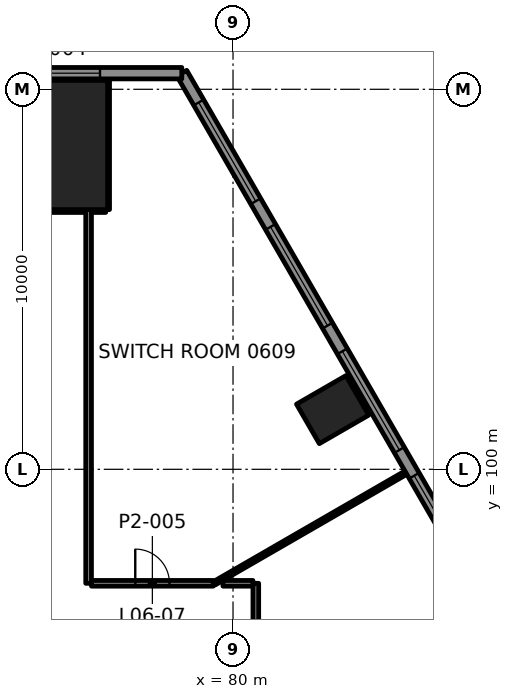
"""IFC4 building model, lengths in metres.
Left out: names, types, materials, properties, quantities, classifications, styles, units other than length and angle.
Written with IfcOpenShell. Run it as: python <this file> out.ifc"""

import sys

from ifc_helpers import new_model, si_unit, direction, frame, frame_2d, origin, origin_2d, place, context, subcontext, project, spatial, rectangle, extrude, element, fill, save


model = new_model("IFC4")
c1 = context("Model", 3, precision=1e-05, world=origin(), true_north=direction((0.0, 1.0)))
c2 = subcontext(c1, "Body", "Model", "MODEL_VIEW")
j1 = project(units=[si_unit("LENGTHUNIT", "METRE"), si_unit("PLANEANGLEUNIT", "RADIAN")], contexts=[c1])
p1 = place(None, origin())
s1 = spatial("IfcSite", under=j1, at=p1, CompositionType="ELEMENT")
p2 = place(p1, origin())
s2 = spatial("IfcBuilding", under=s1, at=p2, CompositionType="ELEMENT")
p3 = place(p2, frame((0.0, 0.0, 31.0)))
s3 = spatial("IfcBuildingStorey", under=s2, at=p3, CompositionType="ELEMENT", Elevation=31.0)
p4 = place(p3, frame((75.0, 108.534, 0.0), z_axis=(0.0, 0.0, 1.0), x_axis=(-1.0, 0.0, 0.0)))
e1 = element("IfcColumn", 1, at=p4, inside=s3, PredefinedType="COLUMN", context=c2, shape_type="SweptSolid", body=[
    extrude(rectangle(XDim=3.4, YDim=3.4, at=origin_2d()), origin(), (0.0, 0.0, 1.0), 4.5),
])
p5 = place(p3, frame((82.621, 101.57, -0.0), z_axis=(0.0, 0.0, 1.0), x_axis=(-0.5, 0.866025403784, 0.0)))
e2 = element("IfcColumn", 2, at=p5, inside=s3, PredefinedType="COLUMN", context=c2, shape_type="SweptSolid", body=[
    extrude(rectangle(XDim=1.2, YDim=1.5, at=origin_2d()), origin(), (0.0, 0.0, 1.0), 4.5),
])
p6 = place(p3, frame((76.275, 97.0, 0.0), z_axis=(0.0, 0.0, 1.0), x_axis=(1.0, 0.0, 0.0)))
e3 = element("IfcWall", 3, at=p6, inside=s3, PredefinedType="PARTITIONING", context=c2, shape_type="SweptSolid", body=[
    extrude(rectangle(XDim=3.205, YDim=0.15, at=frame_2d((1.603, 0.0))), origin(), (0.0, 0.0, 1.0), 3.45),
])
p7 = place(p6, frame((1.153, 0.0, 0.0)))
e4 = element("IfcOpeningElement", 4, at=p7, cuts=e3, PredefinedType="OPENING", context=c2, shape_type="SweptSolid", body=[
    extrude(rectangle(XDim=0.9, YDim=2.1, at=frame_2d((0.45, 1.05))), frame((0.0, 0.085, 0.0), z_axis=(0.0, -1.0, 0.0), x_axis=(1.0, 0.0, 0.0)), (0.0, 0.0, 1.0), 0.17),
])
p8 = place(p3, frame((73.875, 106.834, 0.0), z_axis=(0.0, 0.0, 1.0), x_axis=(1.0, 0.0, 0.0)))
e5 = element("IfcWall", 5, at=p8, inside=s3, PredefinedType="PARTITIONING", context=c2, shape_type="SweptSolid", body=[
    extrude(rectangle(XDim=2.25, YDim=0.15, at=frame_2d((1.125, 0.0))), origin(), (0.0, 0.0, 1.0), 3.447),
])
p9 = place(p3, frame((79.505, 97.0, 0.0), z_axis=(0.0, 0.0, 1.0), x_axis=(0.866009767966, 0.500027081053, 0.0)))
e6 = element("IfcWall", 6, at=p9, inside=s3, PredefinedType="PARTITIONING", context=c2, shape_type="SweptSolid", body=[
    extrude(rectangle(XDim=5.943, YDim=0.1, at=frame_2d((2.972, 0.0))), origin(), (0.0, 0.0, 1.0), 3.215),
])
p10 = place(p3, frame((80.6, 86.4, 0.0), z_axis=(0.0, 0.0, 1.0), x_axis=(0.0, 1.0, 0.0)))
e7 = element("IfcWall", 7, at=p10, inside=s3, PredefinedType="PARTITIONING", context=c2, shape_type="SweptSolid", body=[
    extrude(rectangle(XDim=10.6, YDim=0.15, at=frame_2d((5.3, 0.0))), origin(), (0.0, 0.0, 1.0), 3.45),
])
p11 = place(p3, frame((76.7, 106.834, 0.0), z_axis=(0.0, 0.0, 1.0), x_axis=(0.0, 1.0, 0.0)))
e8 = element("IfcWall", 8, at=p11, inside=s3, PredefinedType="PARTITIONING", context=c2, shape_type="SweptSolid", body=[
    extrude(rectangle(XDim=3.56, YDim=0.1, at=frame_2d((1.78, 0.0))), origin(), (0.0, 0.0, 1.0), 3.45),
])
p12 = place(p3, frame((76.2, 97.0, 0.0), z_axis=(0.0, 0.0, 1.0), x_axis=(0.0, 1.0, 0.0)))
e9 = element("IfcWall", 9, at=p12, inside=s3, PredefinedType="PARTITIONING", context=c2, shape_type="SweptSolid", body=[
    extrude(rectangle(XDim=9.834, YDim=0.15, at=frame_2d((4.917, 0.0))), origin(), (0.0, 0.0, 1.0), 3.45),
])
p13 = place(p3, frame((79.735, 97.0, 0.0), z_axis=(0.0, 0.0, 1.0), x_axis=(1.0, 0.0, 0.0)))
e10 = element("IfcWall", 10, at=p13, inside=s3, PredefinedType="PARTITIONING", context=c2, shape_type="SweptSolid", body=[
    extrude(rectangle(XDim=0.79, YDim=0.15, at=frame_2d((0.395, 0.0))), origin(), (0.0, 0.0, 1.0), 3.45),
])
p14 = place(p3, frame((76.275, 106.834, 0.0), z_axis=(0.0, 0.0, 1.0), x_axis=(1.0, 0.0, 0.0)))
e11 = element("IfcWall", 11, at=p14, inside=s3, PredefinedType="PARTITIONING", context=c2, shape_type="SweptSolid", body=[
    extrude(rectangle(XDim=0.375, YDim=0.15, at=frame_2d((0.187, 0.0))), origin(), (0.0, 0.0, 1.0), 3.45),
])
p15 = place(p3, frame((107.504, 60.451, 0.0), z_axis=(0.0, 0.0, 1.0), x_axis=(-0.500000550228, 0.86602508611, 0.0)))
e12 = element("IfcWall", 12, at=p15, inside=s3, PredefinedType="SOLIDWALL", context=c2, shape_type="SweptSolid", body=[
    extrude(rectangle(XDim=57.704, YDim=0.3, at=frame_2d((28.852, 0.0))), origin(), (0.0, 0.0, 1.0), 4.05),
])
p16 = place(p15, frame((0.89, 0.0, 0.8)))
e13 = element("IfcOpeningElement", 13, at=p16, cuts=e12, PredefinedType="OPENING", context=c2, shape_type="SweptSolid", body=[
    extrude(rectangle(XDim=3.0, YDim=2.4, at=frame_2d((1.5, 1.2))), frame((0.0, 0.16, 0.0), z_axis=(0.0, -1.0, 0.0), x_axis=(1.0, 0.0, 0.0)), (0.0, 0.0, 1.0), 0.32),
])
p17 = place(p15, frame((4.67, 0.0, 0.8)))
e14 = element("IfcOpeningElement", 14, at=p17, cuts=e12, PredefinedType="OPENING", context=c2, shape_type="SweptSolid", body=[
    extrude(rectangle(XDim=3.0, YDim=2.4, at=frame_2d((1.5, 1.2))), frame((0.0, 0.16, 0.0), z_axis=(0.0, -1.0, 0.0), x_axis=(1.0, 0.0, 0.0)), (0.0, 0.0, 1.0), 0.32),
])
p18 = place(p15, frame((8.451, 0.0, 0.8)))
e15 = element("IfcOpeningElement", 15, at=p18, cuts=e12, PredefinedType="OPENING", context=c2, shape_type="SweptSolid", body=[
    extrude(rectangle(XDim=3.0, YDim=2.4, at=frame_2d((1.5, 1.2))), frame((0.0, 0.16, 0.0), z_axis=(0.0, -1.0, 0.0), x_axis=(1.0, 0.0, 0.0)), (0.0, 0.0, 1.0), 0.32),
])
p19 = place(p15, frame((12.231, 0.0, 0.8)))
e16 = element("IfcOpeningElement", 16, at=p19, cuts=e12, PredefinedType="OPENING", context=c2, shape_type="SweptSolid", body=[
    extrude(rectangle(XDim=3.0, YDim=2.4, at=frame_2d((1.5, 1.2))), frame((0.0, 0.16, 0.0), z_axis=(0.0, -1.0, 0.0), x_axis=(1.0, 0.0, 0.0)), (0.0, 0.0, 1.0), 0.32),
])
p20 = place(p15, frame((16.011, 0.0, 0.8)))
e17 = element("IfcOpeningElement", 17, at=p20, cuts=e12, PredefinedType="OPENING", context=c2, shape_type="SweptSolid", body=[
    extrude(rectangle(XDim=3.0, YDim=2.4, at=frame_2d((1.5, 1.2))), frame((0.0, 0.16, 0.0), z_axis=(0.0, -1.0, 0.0), x_axis=(1.0, 0.0, 0.0)), (0.0, 0.0, 1.0), 0.32),
])
p21 = place(p15, frame((19.792, 0.0, 0.8)))
e18 = element("IfcOpeningElement", 18, at=p21, cuts=e12, PredefinedType="OPENING", context=c2, shape_type="SweptSolid", body=[
    extrude(rectangle(XDim=3.0, YDim=2.4, at=frame_2d((1.5, 1.2))), frame((0.0, 0.16, 0.0), z_axis=(0.0, -1.0, 0.0), x_axis=(1.0, 0.0, 0.0)), (0.0, 0.0, 1.0), 0.32),
])
p22 = place(p15, frame((23.572, 0.0, 0.8)))
e19 = element("IfcOpeningElement", 19, at=p22, cuts=e12, PredefinedType="OPENING", context=c2, shape_type="SweptSolid", body=[
    extrude(rectangle(XDim=3.0, YDim=2.4, at=frame_2d((1.5, 1.2))), frame((0.0, 0.16, 0.0), z_axis=(0.0, -1.0, 0.0), x_axis=(1.0, 0.0, 0.0)), (0.0, 0.0, 1.0), 0.32),
])
p23 = place(p15, frame((27.352, 0.0, 0.8)))
e20 = element("IfcOpeningElement", 20, at=p23, cuts=e12, PredefinedType="OPENING", context=c2, shape_type="SweptSolid", body=[
    extrude(rectangle(XDim=3.0, YDim=2.4, at=frame_2d((1.5, 1.2))), frame((0.0, 0.16, 0.0), z_axis=(0.0, -1.0, 0.0), x_axis=(1.0, 0.0, 0.0)), (0.0, 0.0, 1.0), 0.32),
])
p24 = place(p15, frame((31.132, 0.0, 0.8)))
e21 = element("IfcOpeningElement", 21, at=p24, cuts=e12, PredefinedType="OPENING", context=c2, shape_type="SweptSolid", body=[
    extrude(rectangle(XDim=3.0, YDim=2.4, at=frame_2d((1.5, 1.2))), frame((0.0, 0.16, 0.0), z_axis=(0.0, -1.0, 0.0), x_axis=(1.0, 0.0, 0.0)), (0.0, 0.0, 1.0), 0.32),
])
p25 = place(p15, frame((34.913, 0.0, 0.8)))
e22 = element("IfcOpeningElement", 22, at=p25, cuts=e12, PredefinedType="OPENING", context=c2, shape_type="SweptSolid", body=[
    extrude(rectangle(XDim=3.0, YDim=2.4, at=frame_2d((1.5, 1.2))), frame((0.0, 0.16, 0.0), z_axis=(0.0, -1.0, 0.0), x_axis=(1.0, 0.0, 0.0)), (0.0, 0.0, 1.0), 0.32),
])
p26 = place(p15, frame((38.693, 0.0, 0.8)))
e23 = element("IfcOpeningElement", 23, at=p26, cuts=e12, PredefinedType="OPENING", context=c2, shape_type="SweptSolid", body=[
    extrude(rectangle(XDim=3.0, YDim=2.4, at=frame_2d((1.5, 1.2))), frame((0.0, 0.16, 0.0), z_axis=(0.0, -1.0, 0.0), x_axis=(1.0, 0.0, 0.0)), (0.0, 0.0, 1.0), 0.32),
])
p27 = place(p15, frame((42.473, 0.0, 0.8)))
e24 = element("IfcOpeningElement", 24, at=p27, cuts=e12, PredefinedType="OPENING", context=c2, shape_type="SweptSolid", body=[
    extrude(rectangle(XDim=3.0, YDim=2.4, at=frame_2d((1.5, 1.2))), frame((0.0, 0.16, 0.0), z_axis=(0.0, -1.0, 0.0), x_axis=(1.0, 0.0, 0.0)), (0.0, 0.0, 1.0), 0.32),
])
p28 = place(p15, frame((46.253, 0.0, 0.8)))
e25 = element("IfcOpeningElement", 25, at=p28, cuts=e12, PredefinedType="OPENING", context=c2, shape_type="SweptSolid", body=[
    extrude(rectangle(XDim=3.0, YDim=2.4, at=frame_2d((1.5, 1.2))), frame((0.0, 0.16, 0.0), z_axis=(0.0, -1.0, 0.0), x_axis=(1.0, 0.0, 0.0)), (0.0, 0.0, 1.0), 0.32),
])
p29 = place(p15, frame((50.033, 0.0, 0.8)))
e26 = element("IfcOpeningElement", 26, at=p29, cuts=e12, PredefinedType="OPENING", context=c2, shape_type="SweptSolid", body=[
    extrude(rectangle(XDim=3.0, YDim=2.4, at=frame_2d((1.5, 1.2))), frame((0.0, 0.16, 0.0), z_axis=(0.0, -1.0, 0.0), x_axis=(1.0, 0.0, 0.0)), (0.0, 0.0, 1.0), 0.32),
])
p30 = place(p15, frame((53.814, 0.0, 0.8)))
e27 = element("IfcOpeningElement", 27, at=p30, cuts=e12, PredefinedType="OPENING", context=c2, shape_type="SweptSolid", body=[
    extrude(rectangle(XDim=3.0, YDim=2.4, at=frame_2d((1.5, 1.2))), frame((0.0, 0.16, 0.0), z_axis=(0.0, -1.0, 0.0), x_axis=(1.0, 0.0, 0.0)), (0.0, 0.0, 1.0), 0.32),
])
p31 = place(p3, frame((78.652, 110.424, 0.0), z_axis=(0.0, 0.0, 1.0), x_axis=(-1.0, 0.0, 0.0)))
e28 = element("IfcWall", 28, at=p31, inside=s3, PredefinedType="SOLIDWALL", context=c2, shape_type="SweptSolid", body=[
    extrude(rectangle(XDim=7.304, YDim=0.3, at=frame_2d((3.652, 0.0))), origin(), (0.0, 0.0, 1.0), 4.05),
])
p32 = place(p31, frame((2.152, 0.0, 0.8)))
e29 = element("IfcOpeningElement", 29, at=p32, cuts=e28, PredefinedType="OPENING", context=c2, shape_type="SweptSolid", body=[
    extrude(rectangle(XDim=3.0, YDim=2.4, at=frame_2d((1.5, 1.2))), frame((0.0, 0.16, 0.0), z_axis=(0.0, -1.0, 0.0), x_axis=(1.0, 0.0, 0.0)), (0.0, 0.0, 1.0), 0.32),
])
p33 = place(p7, origin())
e30 = element("IfcDoor", 30, at=p33, inside=s3, OperationType="SINGLE_SWING_RIGHT", PredefinedType="DOOR", context=c2, shape_type="SweptSolid", body=[
    extrude(rectangle(XDim=0.9, YDim=2.1, at=frame_2d((0.45, 1.05))), frame((0.0, 0.025, 0.0), z_axis=(0.0, -1.0, 0.0), x_axis=(1.0, 0.0, 0.0)), (0.0, 0.0, 1.0), 0.05),
])
fill(e4, e30)
p34 = place(p27, origin())
e31 = element("IfcWindow", 31, at=p34, inside=s3, PartitioningType="SINGLE_PANEL", PredefinedType="WINDOW", context=c2, shape_type="SweptSolid", body=[
    extrude(rectangle(XDim=3.0, YDim=2.4, at=frame_2d((1.5, 1.2))), frame((0.0, 0.03, 0.0), z_axis=(0.0, -1.0, 0.0), x_axis=(1.0, 0.0, 0.0)), (0.0, 0.0, 1.0), 0.06),
])
fill(e24, e31)
p35 = place(p28, origin())
e32 = element("IfcWindow", 32, at=p35, inside=s3, PartitioningType="SINGLE_PANEL", PredefinedType="WINDOW", context=c2, shape_type="SweptSolid", body=[
    extrude(rectangle(XDim=3.0, YDim=2.4, at=frame_2d((1.5, 1.2))), frame((0.0, 0.03, 0.0), z_axis=(0.0, -1.0, 0.0), x_axis=(1.0, 0.0, 0.0)), (0.0, 0.0, 1.0), 0.06),
])
fill(e25, e32)
p36 = place(p29, origin())
e33 = element("IfcWindow", 33, at=p36, inside=s3, PartitioningType="SINGLE_PANEL", PredefinedType="WINDOW", context=c2, shape_type="SweptSolid", body=[
    extrude(rectangle(XDim=3.0, YDim=2.4, at=frame_2d((1.5, 1.2))), frame((0.0, 0.03, 0.0), z_axis=(0.0, -1.0, 0.0), x_axis=(1.0, 0.0, 0.0)), (0.0, 0.0, 1.0), 0.06),
])
fill(e26, e33)
p37 = place(p30, origin())
e34 = element("IfcWindow", 34, at=p37, inside=s3, PartitioningType="SINGLE_PANEL", PredefinedType="WINDOW", context=c2, shape_type="SweptSolid", body=[
    extrude(rectangle(XDim=3.0, YDim=2.4, at=frame_2d((1.5, 1.2))), frame((0.0, 0.03, 0.0), z_axis=(0.0, -1.0, 0.0), x_axis=(1.0, 0.0, 0.0)), (0.0, 0.0, 1.0), 0.06),
])
fill(e27, e34)
p38 = place(p32, origin())
e35 = element("IfcWindow", 35, at=p38, inside=s3, PartitioningType="SINGLE_PANEL", PredefinedType="WINDOW", context=c2, shape_type="SweptSolid", body=[
    extrude(rectangle(XDim=3.0, YDim=2.4, at=frame_2d((1.5, 1.2))), frame((0.0, 0.03, 0.0), z_axis=(0.0, -1.0, 0.0), x_axis=(1.0, 0.0, 0.0)), (0.0, 0.0, 1.0), 0.06),
])
fill(e29, e35)
save(model, sys.argv[1])
